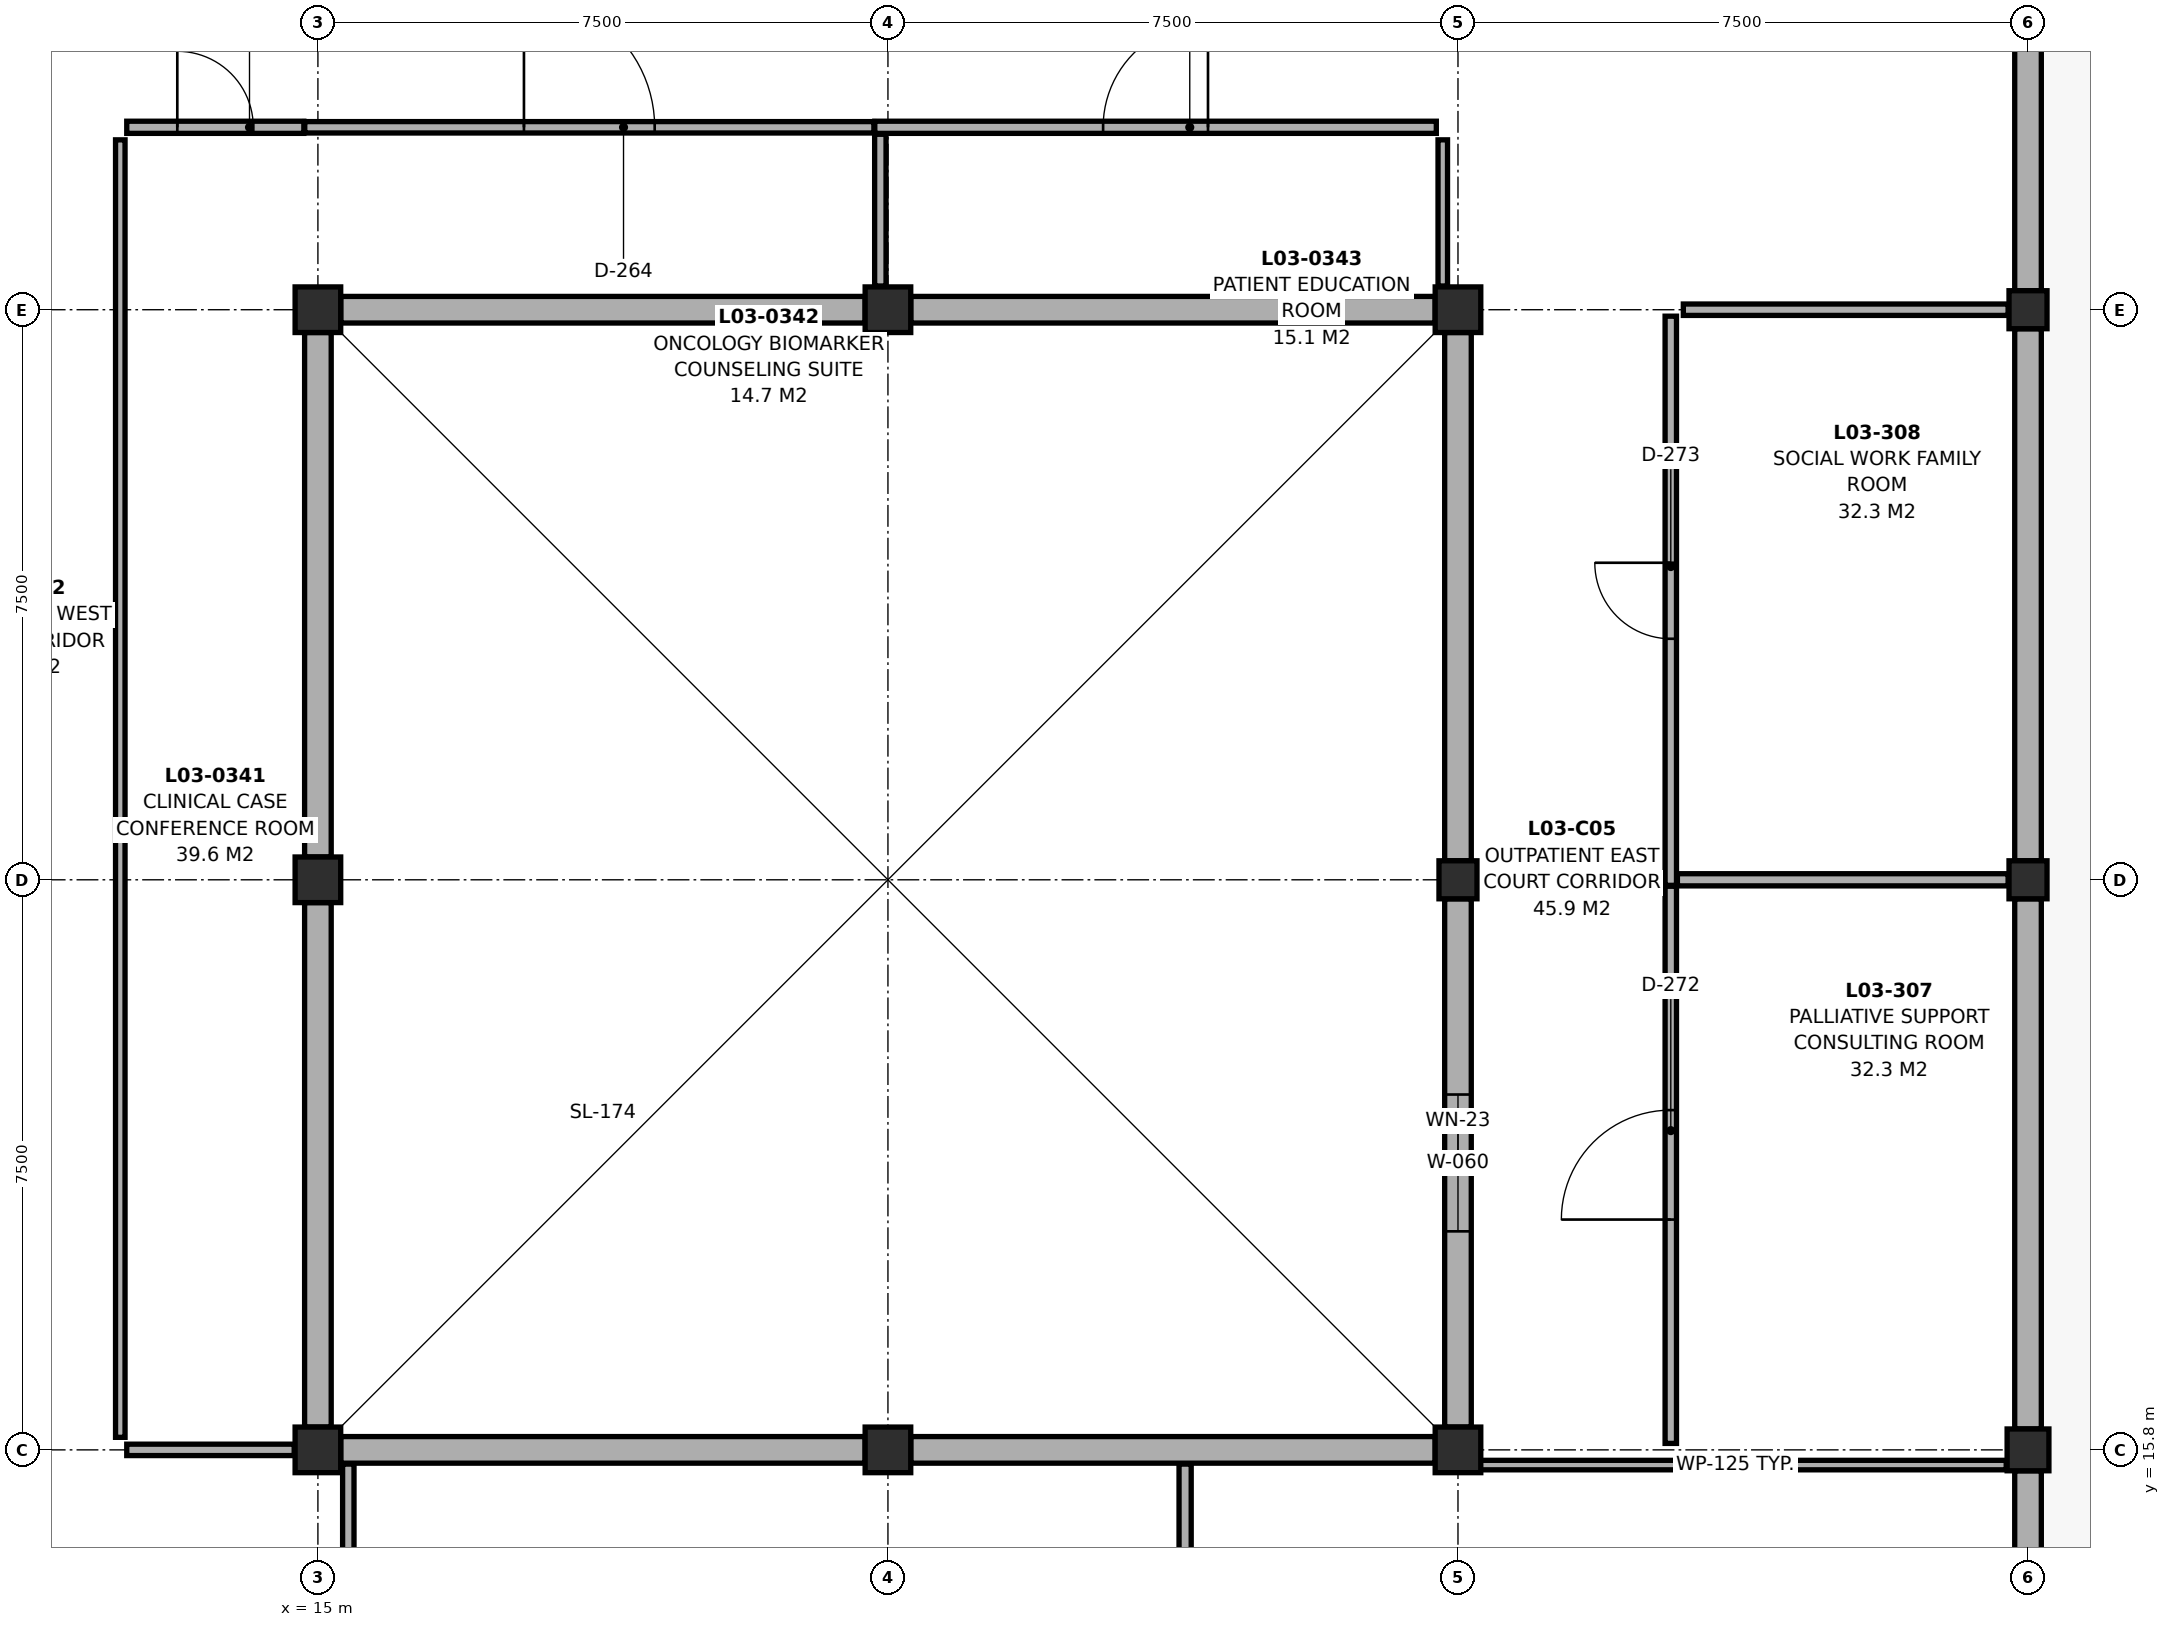
"""IFC4 building model, lengths in metres.
Left out: names, types, materials, properties, quantities, classifications, styles, units other than length and angle.
Written with IfcOpenShell. Run it as: python <this file> out.ifc"""

import sys

from ifc_helpers import new_model, si_unit, direction, frame, frame_2d, origin, origin_2d, place, context, subcontext, project, spatial, rectangle, extrude, element, fill, save


model = new_model("IFC4")
c1 = context("Model", 3, precision=1e-05, world=origin(), true_north=direction((0.0, 1.0)))
c2 = subcontext(c1, "Body", "Model", "MODEL_VIEW")
j1 = project(units=[si_unit("LENGTHUNIT", "METRE"), si_unit("PLANEANGLEUNIT", "RADIAN")], contexts=[c1])
p1 = place(None, origin())
s1 = spatial("IfcSite", under=j1, at=p1, CompositionType="ELEMENT")
p2 = place(p1, origin())
s2 = spatial("IfcBuilding", under=s1, at=p2, CompositionType="ELEMENT")
p3 = place(p2, frame((0.0, 0.0, 13.5)))
s3 = spatial("IfcBuildingStorey", under=s2, at=p3, CompositionType="ELEMENT", Elevation=13.5)
for number, where, z_axis, x_axis in (
    (1, (15.0, 15.8, 0.0), (0.0, 0.0, 1.0), (1.0, 0.0, 0.0)),
    (2, (15.0, 23.3, 0.0), (0.0, 0.0, 1.0), (1.0, 0.0, 0.0)),
    (3, (15.0, 30.8, 0.0), (0.0, 0.0, 1.0), (1.0, 0.0, 0.0)),
    (4, (22.5, 15.8, 0.0), (0.0, 0.0, 1.0), (1.0, 0.0, 0.0)),
    (5, (22.5, 30.8, 0.0), (0.0, 0.0, 1.0), (1.0, 0.0, 0.0)),
    (6, (30.0, 15.8, 0.0), (0.0, 0.0, 1.0), (1.0, 0.0, 0.0)),
):
    element("IfcColumn", number, at=place(p3, frame(where, z_axis=z_axis, x_axis=x_axis)), inside=s3, PredefinedType="COLUMN", context=c2, shape_type="SweptSolid", body=[
        extrude(rectangle(XDim=0.6, YDim=0.6, at=origin_2d()), origin(), (0.0, 0.0, 1.0), 3.72),
    ])
p4 = place(p3, frame((30.0, 23.3, 0.0), z_axis=(0.0, 0.0, 1.0), x_axis=(1.0, 0.0, 0.0)))
e7 = element("IfcColumn", 7, at=p4, inside=s3, PredefinedType="COLUMN", context=c2, shape_type="SweptSolid", body=[
    extrude(rectangle(XDim=0.5, YDim=0.5, at=origin_2d()), origin(), (0.0, 0.0, 1.0), 3.72),
])
p5 = place(p3, frame((30.0, 30.8, 0.0), z_axis=(0.0, 0.0, 1.0), x_axis=(1.0, 0.0, 0.0)))
e8 = element("IfcColumn", 8, at=p5, inside=s3, PredefinedType="COLUMN", context=c2, shape_type="SweptSolid", body=[
    extrude(rectangle(XDim=0.6, YDim=0.6, at=origin_2d()), origin(), (0.0, 0.0, 1.0), 3.72),
])
p6 = place(p3, frame((37.5, 15.8, 0.0), z_axis=(0.0, 0.0, 1.0), x_axis=(1.0, 0.0, 0.0)))
e9 = element("IfcColumn", 9, at=p6, inside=s3, PredefinedType="COLUMN", context=c2, shape_type="SweptSolid", body=[
    extrude(rectangle(XDim=0.55, YDim=0.55, at=origin_2d()), origin(), (0.0, 0.0, 1.0), 3.75),
])
for number, where, z_axis, x_axis in (
    (10, (37.5, 23.3, 0.0), (0.0, 0.0, 1.0), (1.0, 0.0, 0.0)),
    (11, (37.5, 30.8, 0.0), (0.0, 0.0, 1.0), (1.0, 0.0, 0.0)),
):
    element("IfcColumn", number, at=place(p3, frame(where, z_axis=z_axis, x_axis=x_axis)), inside=s3, PredefinedType="COLUMN", context=c2, shape_type="SweptSolid", body=[
        extrude(rectangle(XDim=0.5, YDim=0.5, at=origin_2d()), origin(), (0.0, 0.0, 1.0), 3.72),
    ])
for number, where, z_axis, x_axis in (
    (12, (37.5, 38.05, 0.0), (0.0, 0.0, 1.0), (0.0, -1.0, 0.0)),
    (13, (37.5, 30.55, 0.0), (0.0, 0.0, 1.0), (0.0, -1.0, 0.0)),
):
    element("IfcWall", number, at=place(p3, frame(where, z_axis=z_axis, x_axis=x_axis)), inside=s3, PredefinedType="SOLIDWALL", context=c2, shape_type="SweptSolid", body=[
        extrude(rectangle(XDim=7.0, YDim=0.35, at=frame_2d((3.5, 0.0))), origin(), (0.0, 0.0, 1.0), 3.7),
    ])
p7 = place(p3, frame((37.5, 23.05, 0.0), z_axis=(0.0, 0.0, 1.0), x_axis=(0.0, -1.0, 0.0)))
e14 = element("IfcWall", 14, at=p7, inside=s3, PredefinedType="SOLIDWALL", context=c2, shape_type="SweptSolid", body=[
    extrude(rectangle(XDim=6.975, YDim=0.35, at=frame_2d((3.488, 0.0))), origin(), (0.0, 0.0, 1.0), 3.055),
])
p8 = place(p3, frame((37.5, 15.525, 0.0), z_axis=(0.0, 0.0, 1.0), x_axis=(0.0, -1.0, 0.0)))
e15 = element("IfcWall", 15, at=p8, inside=s3, PredefinedType="SOLIDWALL", context=c2, shape_type="SweptSolid", body=[
    extrude(rectangle(XDim=6.95, YDim=0.35, at=frame_2d((3.475, 0.0))), origin(), (0.0, 0.0, 1.0), 3.005),
])
p9 = place(p8, frame((2.925, 0.0, 0.0)))
e16 = element("IfcOpeningElement", 16, at=p9, cuts=e15, PredefinedType="OPENING", context=c2, shape_type="SweptSolid", body=[
    extrude(rectangle(XDim=1.1, YDim=2.15, at=frame_2d((0.55, 1.075))), frame((0.0, 0.187, 0.0), z_axis=(0.0, -1.0, 0.0), x_axis=(1.0, 0.0, 0.0)), (0.0, 0.0, 1.0), 0.374),
])
for number, where, z_axis, x_axis in (
    (17, (15.3, 15.8, 0.0), (0.0, 0.0, 1.0), (1.0, 0.0, 0.0)),
    (18, (22.8, 15.8, 0.0), (0.0, 0.0, 1.0), (1.0, 0.0, 0.0)),
):
    element("IfcWall", number, at=place(p3, frame(where, z_axis=z_axis, x_axis=x_axis)), inside=s3, PredefinedType="SOLIDWALL", context=c2, shape_type="SweptSolid", body=[
        extrude(rectangle(XDim=6.9, YDim=0.35, at=frame_2d((3.45, 0.0))), origin(), (0.0, 0.0, 1.0), 2.805),
    ])
p10 = place(p3, frame((30.0, 16.1, 0.0), z_axis=(0.0, 0.0, 1.0), x_axis=(0.0, 1.0, 0.0)))
e19 = element("IfcWall", 19, at=p10, inside=s3, PredefinedType="SOLIDWALL", context=c2, shape_type="SweptSolid", body=[
    extrude(rectangle(XDim=6.95, YDim=0.35, at=frame_2d((3.475, 0.0))), origin(), (0.0, 0.0, 1.0), 3.055),
])
p11 = place(p10, frame((2.575, 0.0, 0.9)))
e20 = element("IfcOpeningElement", 20, at=p11, cuts=e19, PredefinedType="OPENING", context=c2, shape_type="SweptSolid", body=[
    extrude(rectangle(XDim=1.8, YDim=1.7, at=frame_2d((0.9, 0.85))), frame((0.0, 0.187, 0.0), z_axis=(0.0, -1.0, 0.0), x_axis=(1.0, 0.0, 0.0)), (0.0, 0.0, 1.0), 0.374),
])
p12 = place(p3, frame((30.0, 23.55, 0.0), z_axis=(0.0, 0.0, 1.0), x_axis=(0.0, 1.0, 0.0)))
e21 = element("IfcWall", 21, at=p12, inside=s3, PredefinedType="SOLIDWALL", context=c2, shape_type="SweptSolid", body=[
    extrude(rectangle(XDim=6.95, YDim=0.35, at=frame_2d((3.475, 0.0))), origin(), (0.0, 0.0, 1.0), 3.055),
])
for number, where, z_axis, x_axis in (
    (22, (29.7, 30.8, 0.0), (0.0, 0.0, 1.0), (-1.0, 0.0, 0.0)),
    (23, (22.2, 30.8, 0.0), (0.0, 0.0, 1.0), (-1.0, 0.0, 0.0)),
    (24, (15.0, 30.5, 0.0), (0.0, 0.0, 1.0), (0.0, -1.0, 0.0)),
    (25, (15.0, 23.0, 0.0), (0.0, 0.0, 1.0), (0.0, -1.0, 0.0)),
):
    element("IfcWall", number, at=place(p3, frame(where, z_axis=z_axis, x_axis=x_axis)), inside=s3, PredefinedType="SOLIDWALL", context=c2, shape_type="SweptSolid", body=[
        extrude(rectangle(XDim=6.9, YDim=0.35, at=frame_2d((3.45, 0.0))), origin(), (0.0, 0.0, 1.0), 2.805),
    ])
p13 = place(p3, frame((12.485, 33.2, 0.0), z_axis=(0.0, 0.0, 1.0), x_axis=(1.0, 0.0, 0.0)))
e26 = element("IfcWall", 26, at=p13, inside=s3, PredefinedType="PARTITIONING", context=c2, shape_type="SweptSolid", body=[
    extrude(rectangle(XDim=2.33, YDim=0.16, at=frame_2d((1.165, 0.0))), origin(), (0.0, 0.0, 1.0), 2.805),
])
p14 = place(p13, frame((0.665, 0.0, 0.0)))
e27 = element("IfcOpeningElement", 27, at=p14, cuts=e26, PredefinedType="OPENING", context=c2, shape_type="SweptSolid", body=[
    extrude(rectangle(XDim=1.0, YDim=2.15, at=frame_2d((0.5, 1.075))), frame((0.0, 0.092, 0.0), z_axis=(0.0, -1.0, 0.0), x_axis=(1.0, 0.0, 0.0)), (0.0, 0.0, 1.0), 0.184),
])
p15 = place(p3, frame((14.827, 33.2, 0.0), z_axis=(0.0, 0.0, 1.0), x_axis=(1.0, 0.0, 0.0)))
e28 = element("IfcWall", 28, at=p15, inside=s3, PredefinedType="PARTITIONING", context=c2, shape_type="SweptSolid", body=[
    extrude(rectangle(XDim=7.488, YDim=0.15, at=frame_2d((3.744, 0.0))), origin(), (0.0, 0.0, 1.0), 2.805),
])
p16 = place(p15, frame((2.884, 0.0, 0.0)))
e29 = element("IfcOpeningElement", 29, at=p16, cuts=e28, PredefinedType="OPENING", context=c2, shape_type="SweptSolid", body=[
    extrude(rectangle(XDim=1.72, YDim=2.34, at=frame_2d((0.86, 1.17))), frame((0.0, 0.087, 0.0), z_axis=(0.0, -1.0, 0.0), x_axis=(1.0, 0.0, 0.0)), (0.0, 0.0, 1.0), 0.174),
])
p17 = place(p3, frame((22.327, 33.2, 0.0), z_axis=(0.0, 0.0, 1.0), x_axis=(1.0, 0.0, 0.0)))
e30 = element("IfcWall", 30, at=p17, inside=s3, PredefinedType="PARTITIONING", context=c2, shape_type="SweptSolid", body=[
    extrude(rectangle(XDim=7.388, YDim=0.16, at=frame_2d((3.694, 0.0))), origin(), (0.0, 0.0, 1.0), 2.805),
])
p18 = place(p17, frame((3.004, 0.0, 0.0)))
e31 = element("IfcOpeningElement", 31, at=p18, cuts=e30, PredefinedType="OPENING", context=c2, shape_type="SweptSolid", body=[
    extrude(rectangle(XDim=1.38, YDim=2.3, at=frame_2d((0.69, 1.15))), frame((0.0, 0.092, 0.0), z_axis=(0.0, -1.0, 0.0), x_axis=(1.0, 0.0, 0.0)), (0.0, 0.0, 1.0), 0.184),
])
p19 = place(p3, frame((32.8, 15.885, 0.0), z_axis=(0.0, 0.0, 1.0), x_axis=(0.0, 1.0, 0.0)))
e32 = element("IfcWall", 32, at=p19, inside=s3, PredefinedType="PARTITIONING", context=c2, shape_type="SweptSolid", body=[
    extrude(rectangle(XDim=7.33, YDim=0.15, at=frame_2d((3.665, 0.0))), origin(), (0.0, 0.0, 1.0), 3.055),
])
p20 = place(p19, frame((2.945, 0.0, 0.0)))
e33 = element("IfcOpeningElement", 33, at=p20, cuts=e32, PredefinedType="OPENING", context=c2, shape_type="SweptSolid", body=[
    extrude(rectangle(XDim=1.44, YDim=2.32, at=frame_2d((0.72, 1.16))), frame((0.0, 0.087, 0.0), z_axis=(0.0, -1.0, 0.0), x_axis=(1.0, 0.0, 0.0)), (0.0, 0.0, 1.0), 0.174),
])
p21 = place(p3, frame((32.8, 23.227, 0.0), z_axis=(0.0, 0.0, 1.0), x_axis=(0.0, 1.0, 0.0)))
e34 = element("IfcWall", 34, at=p21, inside=s3, PredefinedType="PARTITIONING", context=c2, shape_type="SweptSolid", body=[
    extrude(rectangle(XDim=7.488, YDim=0.15, at=frame_2d((3.744, 0.0))), origin(), (0.0, 0.0, 1.0), 3.7),
])
p22 = place(p21, frame((3.244, 0.0, 0.0)))
e35 = element("IfcOpeningElement", 35, at=p22, cuts=e34, PredefinedType="OPENING", context=c2, shape_type="SweptSolid", body=[
    extrude(rectangle(XDim=1.0, YDim=2.15, at=frame_2d((0.5, 1.075))), frame((0.0, 0.087, 0.0), z_axis=(0.0, -1.0, 0.0), x_axis=(1.0, 0.0, 0.0)), (0.0, 0.0, 1.0), 0.174),
])
p23 = place(p3, frame((30.084, 15.6, 0.0), z_axis=(0.0, 0.0, 1.0), x_axis=(1.0, 0.0, 0.0)))
e36 = element("IfcWall", 36, at=p23, inside=s3, PredefinedType="PARTITIONING", context=c2, shape_type="SweptSolid", body=[
    extrude(rectangle(XDim=7.128, YDim=0.125, at=frame_2d((3.564, 0.0))), origin(), (0.0, 0.0, 1.0), 3.005),
])
p24 = place(p3, frame((12.485, 15.8, 0.0), z_axis=(0.0, 0.0, 1.0), x_axis=(1.0, 0.0, 0.0)))
e37 = element("IfcWall", 37, at=p24, inside=s3, PredefinedType="PARTITIONING", context=c2, shape_type="SweptSolid", body=[
    extrude(rectangle(XDim=2.203, YDim=0.15, at=frame_2d((1.102, 0.0))), origin(), (0.0, 0.0, 1.0), 2.805),
])
p25 = place(p3, frame((15.4, 8.187, 0.0), z_axis=(0.0, 0.0, 1.0), x_axis=(0.0, 1.0, 0.0)))
e38 = element("IfcWall", 38, at=p25, inside=s3, PredefinedType="PARTITIONING", context=c2, shape_type="SweptSolid", body=[
    extrude(rectangle(XDim=7.426, YDim=0.15, at=frame_2d((3.713, 0.0))), origin(), (0.0, 0.0, 1.0), 2.805),
])
p26 = place(p3, frame((26.41, 8.187, 0.0), z_axis=(0.0, 0.0, 1.0), x_axis=(0.0, 1.0, 0.0)))
e39 = element("IfcWall", 39, at=p26, inside=s3, PredefinedType="PARTITIONING", context=c2, shape_type="SweptSolid", body=[
    extrude(rectangle(XDim=7.426, YDim=0.16, at=frame_2d((3.713, 0.0))), origin(), (0.0, 0.0, 1.0), 2.805),
])
p27 = place(p3, frame((12.4, 15.965, 0.0), z_axis=(0.0, 0.0, 1.0), x_axis=(0.0, 1.0, 0.0)))
e40 = element("IfcWall", 40, at=p27, inside=s3, PredefinedType="PARTITIONING", context=c2, shape_type="SweptSolid", body=[
    extrude(rectangle(XDim=17.07, YDim=0.125, at=frame_2d((8.535, 0.0))), origin(), (0.0, 0.0, 1.0), 2.805),
])
p28 = place(p3, frame((22.4, 31.112, 0.0), z_axis=(0.0, 0.0, 1.0), x_axis=(0.0, 1.0, 0.0)))
e41 = element("IfcWall", 41, at=p28, inside=s3, PredefinedType="PARTITIONING", context=c2, shape_type="SweptSolid", body=[
    extrude(rectangle(XDim=1.996, YDim=0.15, at=frame_2d((0.998, 0.0))), origin(), (0.0, 0.0, 1.0), 2.805),
])
p29 = place(p3, frame((29.8, 31.112, 0.0), z_axis=(0.0, 0.0, 1.0), x_axis=(0.0, 1.0, 0.0)))
e42 = element("IfcWall", 42, at=p29, inside=s3, PredefinedType="PARTITIONING", context=c2, shape_type="SweptSolid", body=[
    extrude(rectangle(XDim=1.923, YDim=0.125, at=frame_2d((0.961, 0.0))), origin(), (0.0, 0.0, 1.0), 3.055),
])
p30 = place(p3, frame((32.887, 23.3, 0.0), z_axis=(0.0, 0.0, 1.0), x_axis=(1.0, 0.0, 0.0)))
e43 = element("IfcWall", 43, at=p30, inside=s3, PredefinedType="PARTITIONING", context=c2, shape_type="SweptSolid", body=[
    extrude(rectangle(XDim=4.351, YDim=0.16, at=frame_2d((2.176, 0.0))), origin(), (0.0, 0.0, 1.0), 3.7),
])
p31 = place(p3, frame((32.965, 30.8, 0.0), z_axis=(0.0, 0.0, 1.0), x_axis=(1.0, 0.0, 0.0)))
e44 = element("IfcWall", 44, at=p31, inside=s3, PredefinedType="PARTITIONING", context=c2, shape_type="SweptSolid", body=[
    extrude(rectangle(XDim=4.273, YDim=0.15, at=frame_2d((2.136, 0.0))), origin(), (0.0, 0.0, 1.0), 3.7),
])
p32 = place(p11, origin())
e45 = element("IfcWindow", 45, at=p32, inside=s3, PartitioningType="DOUBLE_PANEL_VERTICAL", PredefinedType="WINDOW", context=c2, shape_type="SweptSolid", body=[
    extrude(rectangle(XDim=1.8, YDim=1.7, at=frame_2d((0.9, 0.85))), frame((0.0, 0.03, 0.0), z_axis=(0.0, -1.0, 0.0), x_axis=(1.0, 0.0, 0.0)), (0.0, 0.0, 1.0), 0.06),
])
fill(e20, e45)
p33 = place(p14, origin())
e46 = element("IfcDoor", 46, at=p33, inside=s3, OperationType="SINGLE_SWING_LEFT", PredefinedType="DOOR", context=c2, shape_type="SweptSolid", body=[
    extrude(rectangle(XDim=1.0, YDim=2.15, at=frame_2d((0.5, 1.075))), frame((0.0, 0.025, 0.0), z_axis=(0.0, -1.0, 0.0), x_axis=(1.0, 0.0, 0.0)), (0.0, 0.0, 1.0), 0.05),
])
fill(e27, e46)
p34 = place(p16, origin())
e47 = element("IfcDoor", 47, at=p34, inside=s3, OperationType="SINGLE_SWING_LEFT", PredefinedType="DOOR", context=c2, shape_type="SweptSolid", body=[
    extrude(rectangle(XDim=1.72, YDim=2.34, at=frame_2d((0.86, 1.17))), frame((0.0, 0.025, 0.0), z_axis=(0.0, -1.0, 0.0), x_axis=(1.0, 0.0, 0.0)), (0.0, 0.0, 1.0), 0.05),
])
fill(e29, e47)
p35 = place(p18, origin())
e48 = element("IfcDoor", 48, at=p35, inside=s3, OperationType="SINGLE_SWING_RIGHT", PredefinedType="DOOR", context=c2, shape_type="SweptSolid", body=[
    extrude(rectangle(XDim=1.38, YDim=2.3, at=frame_2d((0.69, 1.15))), frame((0.0, 0.025, 0.0), z_axis=(0.0, -1.0, 0.0), x_axis=(1.0, 0.0, 0.0)), (0.0, 0.0, 1.0), 0.05),
])
fill(e31, e48)
p36 = place(p20, origin())
e49 = element("IfcDoor", 49, at=p36, inside=s3, OperationType="SINGLE_SWING_LEFT", PredefinedType="DOOR", context=c2, shape_type="SweptSolid", body=[
    extrude(rectangle(XDim=1.44, YDim=2.32, at=frame_2d((0.72, 1.16))), frame((0.0, 0.025, 0.0), z_axis=(0.0, -1.0, 0.0), x_axis=(1.0, 0.0, 0.0)), (0.0, 0.0, 1.0), 0.05),
])
fill(e33, e49)
p37 = place(p22, origin())
e50 = element("IfcDoor", 50, at=p37, inside=s3, OperationType="SINGLE_SWING_RIGHT", PredefinedType="DOOR", context=c2, shape_type="SweptSolid", body=[
    extrude(rectangle(XDim=1.0, YDim=2.15, at=frame_2d((0.5, 1.075))), frame((0.0, 0.025, 0.0), z_axis=(0.0, -1.0, 0.0), x_axis=(1.0, 0.0, 0.0)), (0.0, 0.0, 1.0), 0.05),
])
fill(e35, e50)
save(model, sys.argv[1])
